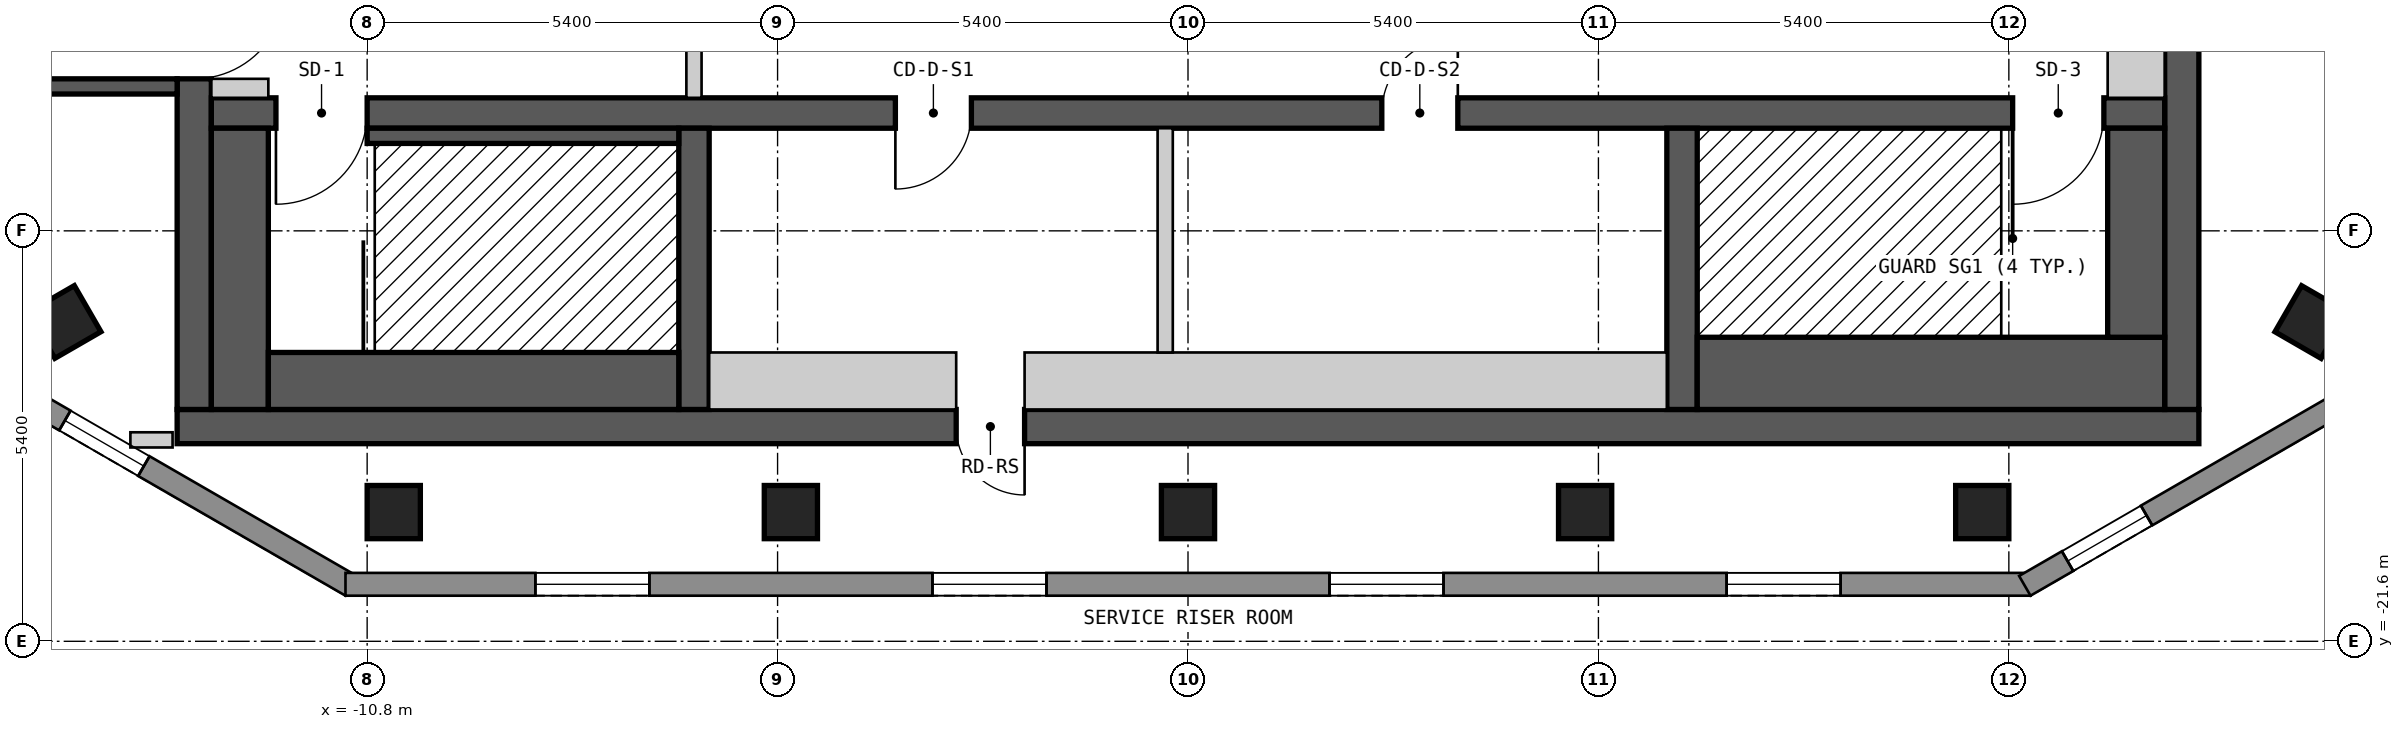
"""IFC4 building model, lengths in metres.
Left out: names, types, materials, properties, quantities, classifications, styles, units other than length and angle.
Written with IfcOpenShell. Run it as: python <this file> out.ifc"""

import sys

from ifc_helpers import new_model, si_unit, direction, frame, frame_2d, origin, origin_2d, place, context, subcontext, project, spatial, polyline, rectangle, outline, extrude, element, fill, save


model = new_model("IFC4")
c1 = context("Model", 3, precision=1e-05, world=origin(), true_north=direction((0.0, 1.0)))
c2 = subcontext(c1, "Body", "Model", "MODEL_VIEW")
j1 = project(units=[si_unit("LENGTHUNIT", "METRE"), si_unit("PLANEANGLEUNIT", "RADIAN")], contexts=[c1])
p1 = place(None, origin())
s1 = spatial("IfcSite", under=j1, at=p1, CompositionType="ELEMENT")
p2 = place(p1, origin())
s2 = spatial("IfcBuilding", under=s1, at=p2, CompositionType="ELEMENT")
p3 = place(p2, frame((0.0, 0.0, 241.8)))
s3 = spatial("IfcBuildingStorey", under=s2, at=p3, CompositionType="ELEMENT", Elevation=241.8)
for number, where, z_axis, x_axis in (
    (1, (-14.781, -17.399, 0.0), (0.0, 0.0, 1.0), (0.5, -0.866, 0.0)),
    (2, (-10.45, -19.9, 0.0), (0.0, 0.0, 1.0), (1.0, 0.0, 0.0)),
    (3, (-5.225, -19.9, 0.0), (0.0, 0.0, 1.0), (1.0, 0.0, 0.0)),
    (4, (0.0, -19.9, 0.0), (0.0, 0.0, 1.0), (1.0, 0.0, 0.0)),
    (5, (5.225, -19.9, 0.0), (0.0, 0.0, 1.0), (1.0, 0.0, 0.0)),
    (6, (10.45, -19.9, 0.0), (0.0, 0.0, 1.0), (1.0, 0.0, 0.0)),
    (7, (14.78, -17.4, 0.0), (0.0, 0.0, 1.0), (0.5, 0.866, 0.0)),
):
    element("IfcColumn", number, at=place(p3, frame(where, z_axis=z_axis, x_axis=x_axis)), inside=s3, PredefinedType="COLUMN", context=c2, shape_type="SweptSolid", body=[
        extrude(rectangle(XDim=0.7, YDim=0.7, at=origin_2d()), origin(), (0.0, 0.0, 1.0), 3.0),
    ])
p4 = place(p3, frame((-13.3, -18.775, 0.0), z_axis=(0.0, 0.0, 1.0), x_axis=(1.0, 0.0, 0.0)))
e8 = element("IfcWall", 8, at=p4, inside=s3, PredefinedType="SHEAR", context=c2, shape_type="SweptSolid", body=[
    extrude(rectangle(XDim=26.6, YDim=0.45, at=frame_2d((13.3, 0.0))), origin(), (0.0, 0.0, 1.0), 2.2),
])
p5 = place(p4, frame((10.25, 0.0, 0.0)))
e9 = element("IfcOpeningElement", 9, at=p5, cuts=e8, PredefinedType="OPENING", context=c2, shape_type="SweptSolid", body=[
    extrude(rectangle(XDim=0.9, YDim=2.1, at=frame_2d((0.45, 1.05))), frame((0.0, 0.235, 0.0), z_axis=(0.0, -1.0, 0.0), x_axis=(1.0, 0.0, 0.0)), (0.0, 0.0, 1.0), 0.47),
])
p6 = place(p3, frame((-13.075, -18.55, 0.0), z_axis=(0.0, 0.0, 1.0), x_axis=(0.0, 1.0, 0.0)))
e10 = element("IfcWall", 10, at=p6, inside=s3, PredefinedType="SHEAR", context=c2, shape_type="SweptSolid", body=[
    extrude(rectangle(XDim=13.1, YDim=0.45, at=frame_2d((6.55, 0.0))), origin(), (0.0, 0.0, 1.0), 2.2),
])
p7 = place(p6, frame((4.35, 0.0, 0.0)))
e11 = element("IfcOpeningElement", 11, at=p7, cuts=e10, PredefinedType="OPENING", context=c2, shape_type="SweptSolid", body=[
    extrude(rectangle(XDim=1.2, YDim=2.1, at=frame_2d((0.6, 1.05))), frame((0.0, 0.235, 0.0), z_axis=(0.0, -1.0, 0.0), x_axis=(1.0, 0.0, 0.0)), (0.0, 0.0, 1.0), 0.47),
])
p8 = place(p3, frame((13.075, -18.55, 0.0), z_axis=(0.0, 0.0, 1.0), x_axis=(0.0, 1.0, 0.0)))
e12 = element("IfcWall", 12, at=p8, inside=s3, PredefinedType="SHEAR", context=c2, shape_type="SweptSolid", body=[
    extrude(rectangle(XDim=13.1, YDim=0.45, at=frame_2d((6.55, 0.0))), origin(), (0.0, 0.0, 1.0), 2.2),
])
p9 = place(p3, frame((-12.85, -14.65, 0.0), z_axis=(0.0, 0.0, 1.0), x_axis=(1.0, 0.0, 0.0)))
e13 = element("IfcWall", 13, at=p9, inside=s3, PredefinedType="SHEAR", context=c2, shape_type="SweptSolid", body=[
    extrude(rectangle(XDim=25.7, YDim=0.4, at=frame_2d((12.85, 0.0))), origin(), (0.0, 0.0, 1.0), 2.2),
])
p10 = place(p9, frame((2.05, 0.0, 0.0), z_axis=(0.0, 0.0, 1.0), x_axis=(-1.0, 0.0, 0.0)))
e14 = element("IfcOpeningElement", 14, at=p10, cuts=e13, PredefinedType="OPENING", context=c2, shape_type="SweptSolid", body=[
    extrude(rectangle(XDim=1.2, YDim=2.1, at=frame_2d((0.6, 1.05))), frame((0.0, 0.21, 0.0), z_axis=(0.0, -1.0, 0.0), x_axis=(1.0, 0.0, 0.0)), (0.0, 0.0, 1.0), 0.42),
])
p11 = place(p9, frame((24.9, 0.0, 0.0), z_axis=(0.0, 0.0, 1.0), x_axis=(-1.0, 0.0, 0.0)))
e15 = element("IfcOpeningElement", 15, at=p11, cuts=e13, PredefinedType="OPENING", context=c2, shape_type="SweptSolid", body=[
    extrude(rectangle(XDim=1.2, YDim=2.1, at=frame_2d((0.6, 1.05))), frame((0.0, 0.21, 0.0), z_axis=(0.0, -1.0, 0.0), x_axis=(1.0, 0.0, 0.0)), (0.0, 0.0, 1.0), 0.42),
])
p12 = place(p9, frame((10.0, 0.0, 0.0), z_axis=(0.0, 0.0, 1.0), x_axis=(-1.0, 0.0, 0.0)))
e16 = element("IfcOpeningElement", 16, at=p12, cuts=e13, PredefinedType="OPENING", context=c2, shape_type="SweptSolid", body=[
    extrude(rectangle(XDim=1.0, YDim=2.1, at=frame_2d((0.5, 1.05))), frame((0.0, 0.21, 0.0), z_axis=(0.0, -1.0, 0.0), x_axis=(1.0, 0.0, 0.0)), (0.0, 0.0, 1.0), 0.42),
])
p13 = place(p9, frame((16.4, 0.0, 0.0), z_axis=(0.0, 0.0, 1.0), x_axis=(-1.0, 0.0, 0.0)))
e17 = element("IfcOpeningElement", 17, at=p13, cuts=e13, PredefinedType="OPENING", context=c2, shape_type="SweptSolid", body=[
    extrude(rectangle(XDim=1.0, YDim=2.1, at=frame_2d((0.5, 1.05))), frame((0.0, 0.21, 0.0), z_axis=(0.0, -1.0, 0.0), x_axis=(1.0, 0.0, 0.0)), (0.0, 0.0, 1.0), 0.42),
])
for number, where, z_axis, x_axis in (
    (18, (-6.5, -18.55, 0.0), (0.0, 0.0, 1.0), (0.0, 1.0, 0.0)),
    (19, (6.5, -18.55, 0.0), (0.0, 0.0, 1.0), (0.0, 1.0, 0.0)),
):
    element("IfcWall", number, at=place(p3, frame(where, z_axis=z_axis, x_axis=x_axis)), inside=s3, PredefinedType="SHEAR", context=c2, shape_type="SweptSolid", body=[
        extrude(rectangle(XDim=3.7, YDim=0.4, at=frame_2d((1.85, 0.0))), origin(), (0.0, 0.0, 1.0), 2.2),
    ])
p14 = place(p3, frame((-15.34, -18.37, 0.0), z_axis=(0.0, 0.0, 1.0), x_axis=(0.866022959057, -0.500004234368, 0.0)))
e20 = element("IfcWall", 20, at=p14, inside=s3, PredefinedType="SOLIDWALL", context=c2, shape_type="SweptSolid", body=[
    extrude(outline(polyline([(0.0, -0.15), (5.0, -0.15), (4.92, 0.15), (0.08, 0.15), (0.0, -0.15)])), origin(), (0.0, 0.0, 1.0), 2.2),
])
p15 = place(p14, frame((0.65, 0.0, 0.15)))
e21 = element("IfcOpeningElement", 21, at=p15, cuts=e20, PredefinedType="OPENING", context=c2, shape_type="SweptSolid", body=[
    extrude(rectangle(XDim=1.2, YDim=2.1, at=frame_2d((0.6, 1.05))), frame((0.0, 0.16, 0.0), z_axis=(0.0, -1.0, 0.0), x_axis=(1.0, 0.0, 0.0)), (0.0, 0.0, 1.0), 0.32),
])
p16 = place(p3, frame((-11.085, -20.85, 0.0), z_axis=(0.0, 0.0, 1.0), x_axis=(1.0, 0.0, 0.0)))
e22 = element("IfcWall", 22, at=p16, inside=s3, PredefinedType="SOLIDWALL", context=c2, shape_type="SweptSolid", body=[
    extrude(outline(polyline([(0.0, -0.15), (22.17, -0.15), (22.09, 0.15), (0.08, 0.15), (0.0, -0.15)])), origin(), (0.0, 0.0, 1.0), 2.2),
])
p17 = place(p16, frame((2.498, 0.0, 0.15)))
e23 = element("IfcOpeningElement", 23, at=p17, cuts=e22, PredefinedType="OPENING", context=c2, shape_type="SweptSolid", body=[
    extrude(rectangle(XDim=1.5, YDim=2.1, at=frame_2d((0.75, 1.05))), frame((0.0, 0.16, 0.0), z_axis=(0.0, -1.0, 0.0), x_axis=(1.0, 0.0, 0.0)), (0.0, 0.0, 1.0), 0.32),
])
p18 = place(p16, frame((7.723, 0.0, 0.15)))
e24 = element("IfcOpeningElement", 24, at=p18, cuts=e22, PredefinedType="OPENING", context=c2, shape_type="SweptSolid", body=[
    extrude(rectangle(XDim=1.5, YDim=2.1, at=frame_2d((0.75, 1.05))), frame((0.0, 0.16, 0.0), z_axis=(0.0, -1.0, 0.0), x_axis=(1.0, 0.0, 0.0)), (0.0, 0.0, 1.0), 0.32),
])
p19 = place(p16, frame((12.947, 0.0, 0.15)))
e25 = element("IfcOpeningElement", 25, at=p19, cuts=e22, PredefinedType="OPENING", context=c2, shape_type="SweptSolid", body=[
    extrude(rectangle(XDim=1.5, YDim=2.1, at=frame_2d((0.75, 1.05))), frame((0.0, 0.16, 0.0), z_axis=(0.0, -1.0, 0.0), x_axis=(1.0, 0.0, 0.0)), (0.0, 0.0, 1.0), 0.32),
])
p20 = place(p16, frame((18.172, 0.0, 0.15)))
e26 = element("IfcOpeningElement", 26, at=p20, cuts=e22, PredefinedType="OPENING", context=c2, shape_type="SweptSolid", body=[
    extrude(rectangle(XDim=1.5, YDim=2.1, at=frame_2d((0.75, 1.05))), frame((0.0, 0.16, 0.0), z_axis=(0.0, -1.0, 0.0), x_axis=(1.0, 0.0, 0.0)), (0.0, 0.0, 1.0), 0.32),
])
p21 = place(p3, frame((11.01, -20.87, 0.0), z_axis=(0.0, 0.0, 1.0), x_axis=(0.866022959057, 0.500004234368, 0.0)))
e27 = element("IfcWall", 27, at=p21, inside=s3, PredefinedType="SOLIDWALL", context=c2, shape_type="SweptSolid", body=[
    extrude(outline(polyline([(0.0, -0.15), (5.0, -0.15), (4.92, 0.15), (0.08, 0.15), (0.0, -0.15)])), origin(), (0.0, 0.0, 1.0), 2.2),
])
p22 = place(p21, frame((0.65, 0.0, 0.15)))
e28 = element("IfcOpeningElement", 28, at=p22, cuts=e27, PredefinedType="OPENING", context=c2, shape_type="SweptSolid", body=[
    extrude(rectangle(XDim=1.2, YDim=2.1, at=frame_2d((0.6, 1.05))), frame((0.0, 0.16, 0.0), z_axis=(0.0, -1.0, 0.0), x_axis=(1.0, 0.0, 0.0)), (0.0, 0.0, 1.0), 0.32),
])
p23 = place(p3, frame((-13.915, -18.95, 0.0), z_axis=(0.0, 0.0, 1.0), x_axis=(1.0, 0.0, 0.0)))
e29 = element("IfcWall", 29, at=p23, inside=s3, PredefinedType="PARTITIONING", context=c2, shape_type="SweptSolid", body=[
    extrude(rectangle(XDim=0.555, YDim=0.2, at=frame_2d((0.277, 0.0))), origin(), (0.0, 0.0, 1.0), 2.2),
])
p24 = place(p3, frame((-16.05, -14.3, 0.0), z_axis=(0.0, 0.0, 1.0), x_axis=(1.0, 0.0, 0.0)))
e30 = element("IfcWall", 30, at=p24, inside=s3, PredefinedType="SOLIDWALL", context=c2, shape_type="SweptSolid", body=[
    extrude(rectangle(XDim=2.75, YDim=0.2, at=frame_2d((1.375, 0.0))), origin(), (0.0, 0.0, 1.0), 2.2),
])
p25 = place(p3, frame((-12.475, -18.55, 0.0), z_axis=(0.0, 0.0, 1.0), x_axis=(0.0, 1.0, 0.0)))
e31 = element("IfcWall", 31, at=p25, inside=s3, PredefinedType="SOLIDWALL", context=c2, shape_type="SweptSolid", body=[
    extrude(rectangle(XDim=3.7, YDim=0.75, at=frame_2d((1.85, 0.0))), origin(), (0.0, 0.0, 1.0), 2.2),
])
p26 = place(p3, frame((-12.85, -14.325, 0.0), z_axis=(0.0, 0.0, 1.0), x_axis=(1.0, 0.0, 0.0)))
e32 = element("IfcWall", 32, at=p26, inside=s3, PredefinedType="PARTITIONING", context=c2, shape_type="SweptSolid", body=[
    extrude(rectangle(XDim=0.75, YDim=0.25, at=frame_2d((0.375, 0.0))), origin(), (0.0, 0.0, 1.0), 2.2),
])
p27 = place(p3, frame((-12.1, -18.175, 0.0), z_axis=(0.0, 0.0, 1.0), x_axis=(1.0, 0.0, 0.0)))
e33 = element("IfcWall", 33, at=p27, inside=s3, PredefinedType="SOLIDWALL", context=c2, shape_type="SweptSolid", body=[
    extrude(rectangle(XDim=5.4, YDim=0.75, at=frame_2d((2.7, 0.0))), origin(), (0.0, 0.0, 1.0), 2.2),
])
p28 = place(p3, frame((-10.8, -14.95, 0.0), z_axis=(0.0, 0.0, 1.0), x_axis=(1.0, 0.0, 0.0)))
e34 = element("IfcWall", 34, at=p28, inside=s3, PredefinedType="SOLIDWALL", context=c2, shape_type="SweptSolid", body=[
    extrude(rectangle(XDim=4.1, YDim=0.2, at=frame_2d((2.05, 0.0))), origin(), (0.0, 0.0, 1.0), 2.2),
])
p29 = place(p3, frame((-6.5, -14.45, 0.0), z_axis=(0.0, 0.0, 1.0), x_axis=(0.0, 1.0, 0.0)))
e35 = element("IfcWall", 35, at=p29, inside=s3, PredefinedType="PARTITIONING", context=c2, shape_type="SweptSolid", body=[
    extrude(rectangle(XDim=4.9, YDim=0.2, at=frame_2d((2.45, 0.0))), origin(), (0.0, 0.0, 1.0), 2.2),
])
p30 = place(p29, frame((3.15, 0.0, 0.0), z_axis=(0.0, 0.0, 1.0), x_axis=(-1.0, 0.0, 0.0)))
e36 = element("IfcOpeningElement", 36, at=p30, cuts=e35, PredefinedType="OPENING", context=c2, shape_type="SweptSolid", body=[
    extrude(rectangle(XDim=1.4, YDim=2.1, at=frame_2d((0.7, 1.05))), frame((0.0, 0.11, 0.0), z_axis=(0.0, -1.0, 0.0), x_axis=(1.0, 0.0, 0.0)), (0.0, 0.0, 1.0), 0.22),
])
p31 = place(p3, frame((-6.3, -18.175, 0.0), z_axis=(0.0, 0.0, 1.0), x_axis=(1.0, 0.0, 0.0)))
e37 = element("IfcWall", 37, at=p31, inside=s3, PredefinedType="PARTITIONING", context=c2, shape_type="SweptSolid", body=[
    extrude(rectangle(XDim=3.25, YDim=0.75, at=frame_2d((1.625, 0.0))), origin(), (0.0, 0.0, 1.0), 2.2),
])
p32 = place(p3, frame((-2.15, -18.175, 0.0), z_axis=(0.0, 0.0, 1.0), x_axis=(1.0, 0.0, 0.0)))
e38 = element("IfcWall", 38, at=p32, inside=s3, PredefinedType="PARTITIONING", context=c2, shape_type="SweptSolid", body=[
    extrude(rectangle(XDim=8.45, YDim=0.75, at=frame_2d((4.225, 0.0))), origin(), (0.0, 0.0, 1.0), 2.2),
])
p33 = place(p3, frame((-0.3, -17.8, 0.0), z_axis=(0.0, 0.0, 1.0), x_axis=(0.0, 1.0, 0.0)))
e39 = element("IfcWall", 39, at=p33, inside=s3, PredefinedType="PARTITIONING", context=c2, shape_type="SweptSolid", body=[
    extrude(rectangle(XDim=2.95, YDim=0.2, at=frame_2d((1.475, 0.0))), origin(), (0.0, 0.0, 1.0), 2.2),
])
p34 = place(p3, frame((6.7, -18.075, 0.0), z_axis=(0.0, 0.0, 1.0), x_axis=(1.0, 0.0, 0.0)))
e40 = element("IfcWall", 40, at=p34, inside=s3, PredefinedType="SOLIDWALL", context=c2, shape_type="SweptSolid", body=[
    extrude(rectangle(XDim=6.15, YDim=0.95, at=frame_2d((3.075, 0.0))), origin(), (0.0, 0.0, 1.0), 2.2),
])
p35 = place(p3, frame((12.475, -17.6, 0.0), z_axis=(0.0, 0.0, 1.0), x_axis=(0.0, 1.0, 0.0)))
e41 = element("IfcWall", 41, at=p35, inside=s3, PredefinedType="SOLIDWALL", context=c2, shape_type="SweptSolid", body=[
    extrude(rectangle(XDim=2.75, YDim=0.75, at=frame_2d((1.375, 0.0))), origin(), (0.0, 0.0, 1.0), 2.2),
])
p36 = place(p3, frame((12.475, -14.45, 0.0), z_axis=(0.0, 0.0, 1.0), x_axis=(0.0, 1.0, 0.0)))
e42 = element("IfcWall", 42, at=p36, inside=s3, PredefinedType="PARTITIONING", context=c2, shape_type="SweptSolid", body=[
    extrude(rectangle(XDim=8.25, YDim=0.75, at=frame_2d((4.125, 0.0))), origin(), (0.0, 0.0, 1.0), 2.2),
])
p37 = place(p15, origin())
e43 = element("IfcWindow", 43, at=p37, inside=s3, PartitioningType="SINGLE_PANEL", PredefinedType="WINDOW", context=c2, shape_type="SweptSolid", body=[
    extrude(rectangle(XDim=1.2, YDim=2.1, at=frame_2d((0.6, 1.05))), frame((0.0, 0.03, 0.0), z_axis=(0.0, -1.0, 0.0), x_axis=(1.0, 0.0, 0.0)), (0.0, 0.0, 1.0), 0.06),
])
fill(e21, e43)
p38 = place(p17, origin())
e44 = element("IfcWindow", 44, at=p38, inside=s3, PartitioningType="SINGLE_PANEL", PredefinedType="WINDOW", context=c2, shape_type="SweptSolid", body=[
    extrude(rectangle(XDim=1.5, YDim=2.1, at=frame_2d((0.75, 1.05))), frame((0.0, 0.03, 0.0), z_axis=(0.0, -1.0, 0.0), x_axis=(1.0, 0.0, 0.0)), (0.0, 0.0, 1.0), 0.06),
])
fill(e23, e44)
p39 = place(p18, origin())
e45 = element("IfcWindow", 45, at=p39, inside=s3, PartitioningType="SINGLE_PANEL", PredefinedType="WINDOW", context=c2, shape_type="SweptSolid", body=[
    extrude(rectangle(XDim=1.5, YDim=2.1, at=frame_2d((0.75, 1.05))), frame((0.0, 0.03, 0.0), z_axis=(0.0, -1.0, 0.0), x_axis=(1.0, 0.0, 0.0)), (0.0, 0.0, 1.0), 0.06),
])
fill(e24, e45)
p40 = place(p19, origin())
e46 = element("IfcWindow", 46, at=p40, inside=s3, PartitioningType="SINGLE_PANEL", PredefinedType="WINDOW", context=c2, shape_type="SweptSolid", body=[
    extrude(rectangle(XDim=1.5, YDim=2.1, at=frame_2d((0.75, 1.05))), frame((0.0, 0.03, 0.0), z_axis=(0.0, -1.0, 0.0), x_axis=(1.0, 0.0, 0.0)), (0.0, 0.0, 1.0), 0.06),
])
fill(e25, e46)
p41 = place(p20, origin())
e47 = element("IfcWindow", 47, at=p41, inside=s3, PartitioningType="SINGLE_PANEL", PredefinedType="WINDOW", context=c2, shape_type="SweptSolid", body=[
    extrude(rectangle(XDim=1.5, YDim=2.1, at=frame_2d((0.75, 1.05))), frame((0.0, 0.03, 0.0), z_axis=(0.0, -1.0, 0.0), x_axis=(1.0, 0.0, 0.0)), (0.0, 0.0, 1.0), 0.06),
])
fill(e26, e47)
p42 = place(p22, origin())
e48 = element("IfcWindow", 48, at=p42, inside=s3, PartitioningType="SINGLE_PANEL", PredefinedType="WINDOW", context=c2, shape_type="SweptSolid", body=[
    extrude(rectangle(XDim=1.2, YDim=2.1, at=frame_2d((0.6, 1.05))), frame((0.0, 0.03, 0.0), z_axis=(0.0, -1.0, 0.0), x_axis=(1.0, 0.0, 0.0)), (0.0, 0.0, 1.0), 0.06),
])
fill(e28, e48)
p43 = place(p10, origin())
e49 = element("IfcDoor", 49, at=p43, inside=s3, OperationType="SINGLE_SWING_RIGHT", PredefinedType="DOOR", context=c2, shape_type="SweptSolid", body=[
    extrude(rectangle(XDim=1.2, YDim=2.1, at=frame_2d((0.6, 1.05))), frame((0.0, 0.025, 0.0), z_axis=(0.0, -1.0, 0.0), x_axis=(1.0, 0.0, 0.0)), (0.0, 0.0, 1.0), 0.05),
])
fill(e14, e49)
p44 = place(p11, origin())
e50 = element("IfcDoor", 50, at=p44, inside=s3, OperationType="SINGLE_SWING_RIGHT", PredefinedType="DOOR", context=c2, shape_type="SweptSolid", body=[
    extrude(rectangle(XDim=1.2, YDim=2.1, at=frame_2d((0.6, 1.05))), frame((0.0, 0.025, 0.0), z_axis=(0.0, -1.0, 0.0), x_axis=(1.0, 0.0, 0.0)), (0.0, 0.0, 1.0), 0.05),
])
fill(e15, e50)
p45 = place(p7, origin())
e51 = element("IfcDoor", 51, at=p45, inside=s3, OperationType="SINGLE_SWING_RIGHT", PredefinedType="DOOR", context=c2, shape_type="SweptSolid", body=[
    extrude(rectangle(XDim=1.2, YDim=2.1, at=frame_2d((0.6, 1.05))), frame((0.0, 0.025, 0.0), z_axis=(0.0, -1.0, 0.0), x_axis=(1.0, 0.0, 0.0)), (0.0, 0.0, 1.0), 0.05),
])
fill(e11, e51)
p46 = place(p12, origin())
e52 = element("IfcDoor", 52, at=p46, inside=s3, OperationType="SINGLE_SWING_RIGHT", PredefinedType="DOOR", context=c2, shape_type="SweptSolid", body=[
    extrude(rectangle(XDim=1.0, YDim=2.1, at=frame_2d((0.5, 1.05))), frame((0.0, 0.025, 0.0), z_axis=(0.0, -1.0, 0.0), x_axis=(1.0, 0.0, 0.0)), (0.0, 0.0, 1.0), 0.05),
])
fill(e16, e52)
p47 = place(p13, origin())
e53 = element("IfcDoor", 53, at=p47, inside=s3, OperationType="SINGLE_SWING_LEFT", PredefinedType="DOOR", context=c2, shape_type="SweptSolid", body=[
    extrude(rectangle(XDim=1.0, YDim=2.1, at=frame_2d((0.5, 1.05))), frame((0.0, 0.025, 0.0), z_axis=(0.0, -1.0, 0.0), x_axis=(1.0, 0.0, 0.0)), (0.0, 0.0, 1.0), 0.05),
])
fill(e17, e53)
p48 = place(p5, origin())
e54 = element("IfcDoor", 54, at=p48, inside=s3, OperationType="SINGLE_SWING_RIGHT", PredefinedType="DOOR", context=c2, shape_type="SweptSolid", body=[
    extrude(rectangle(XDim=0.9, YDim=2.1, at=frame_2d((0.45, 1.05))), frame((0.0, 0.025, 0.0), z_axis=(0.0, -1.0, 0.0), x_axis=(1.0, 0.0, 0.0)), (0.0, 0.0, 1.0), 0.05),
])
fill(e9, e54)
save(model, sys.argv[1])
